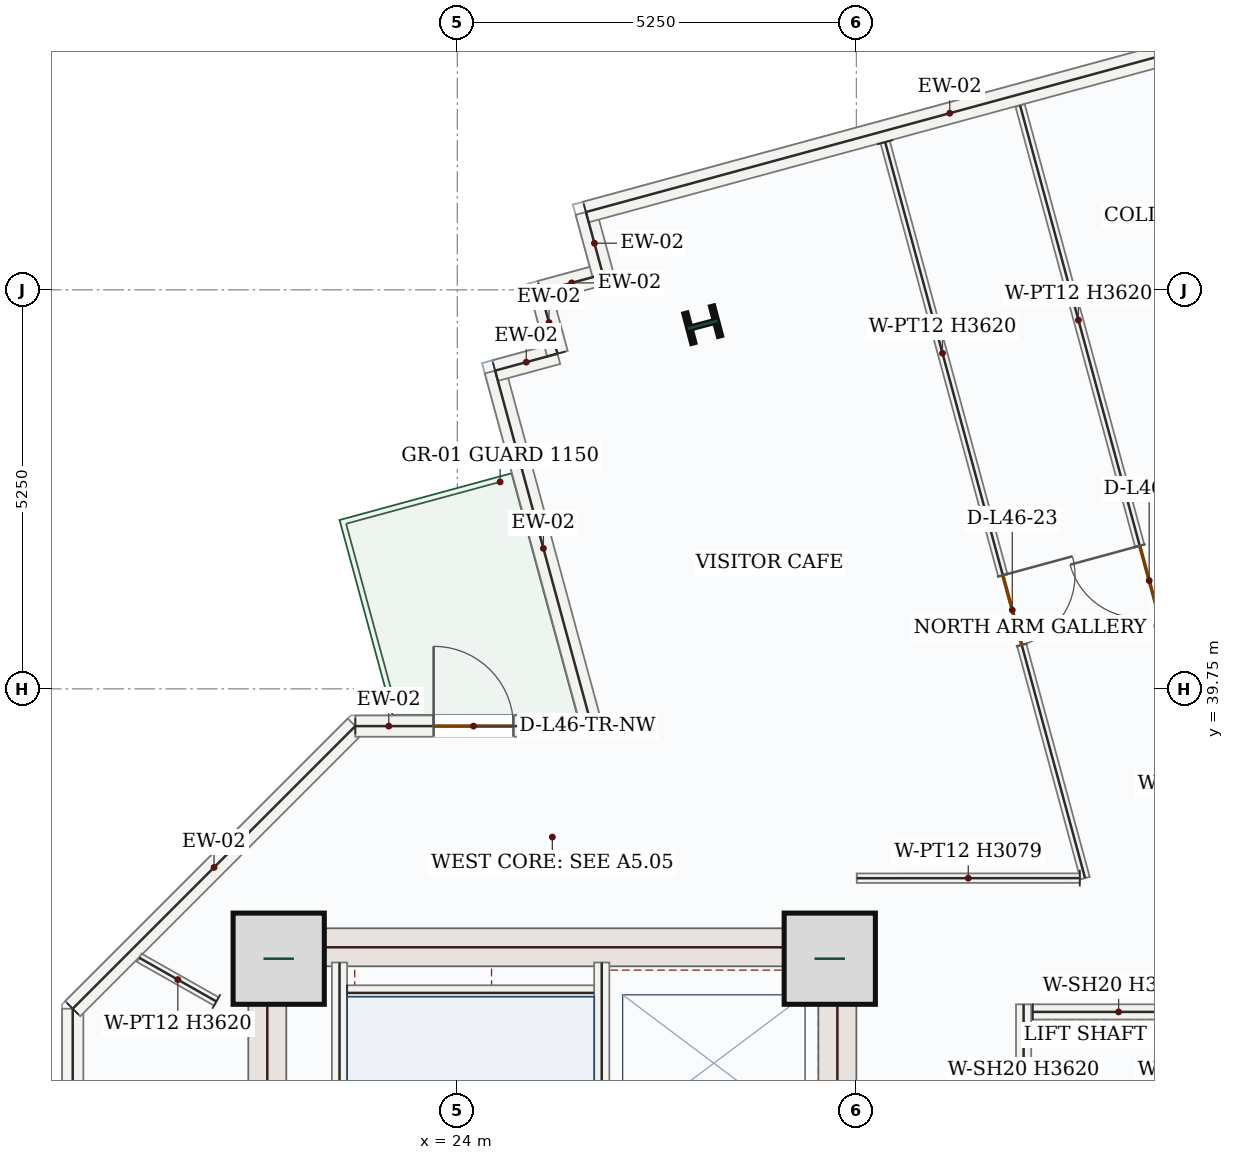
"""IFC4 building model, lengths in metres.
Left out: names, types, materials, properties, quantities, classifications, styles, units other than length and angle.
Written with IfcOpenShell. Run it as: python <this file> out.ifc"""

import sys

from ifc_helpers import new_model, si_unit, direction, frame, frame_2d, origin, origin_2d, place, context, subcontext, project, spatial, rectangle, i_section, extrude, source, transform, mapped, element, fill, save


model = new_model("IFC4")
c1 = context("Model", 3, precision=1e-05, world=origin(), true_north=direction((0.0, 1.0)))
c2 = subcontext(c1, "Body", "Model", "MODEL_VIEW")
j1 = project(units=[si_unit("LENGTHUNIT", "METRE"), si_unit("PLANEANGLEUNIT", "RADIAN")], contexts=[c1])
p1 = place(None, origin())
s1 = spatial("IfcSite", under=j1, at=p1, CompositionType="ELEMENT")
p2 = place(p1, origin())
s2 = spatial("IfcBuilding", under=s1, at=p2, CompositionType="ELEMENT")
p3 = place(p2, frame((0.0, 0.0, 198.0)))
s3 = spatial("IfcBuildingStorey", under=s2, at=p3, CompositionType="ELEMENT", Elevation=198.0)
m1 = source(origin(), c2, "Body", "SweptSolid", [
    extrude(rectangle(XDim=8.55, YDim=0.5, at=frame_2d((4.275, 0.0))), origin(), (0.0, 0.0, 1.0), 3.62),
])
p4 = place(p3, frame((21.5, 28.05, 0.0), z_axis=(0.0, 0.0, 1.0), x_axis=(0.0, 1.0, 0.0)))
e1 = element("IfcWall", 1, at=p4, inside=s3, PredefinedType="SHEAR", context=c2, shape_type="MappedRepresentation", body=[
    mapped(m1, transform((0.0, 0.0, 0.0), x_axis=(1.0, 0.0, 0.0), y_axis=(0.0, 1.0, 0.0), z_axis=(0.0, 0.0, 1.0), scale=1.0)),
])
p5 = place(p3, frame((29.0, 28.05, 0.0), z_axis=(0.0, 0.0, 1.0), x_axis=(0.0, 1.0, 0.0)))
e2 = element("IfcWall", 2, at=p5, inside=s3, PredefinedType="SHEAR", context=c2, shape_type="SweptSolid", body=[
    extrude(rectangle(XDim=8.55, YDim=0.5, at=frame_2d((4.275, 0.0))), origin(), (0.0, 0.0, 1.0), 3.62),
])
p6 = place(p5, frame((1.5, 0.0, 0.0)))
e3 = element("IfcOpeningElement", 3, at=p6, cuts=e2, PredefinedType="OPENING", context=c2, shape_type="SweptSolid", body=[
    extrude(rectangle(XDim=1.1, YDim=2.2, at=frame_2d((0.55, 1.1))), frame((0.0, 0.26, 0.0), z_axis=(0.0, -1.0, 0.0), x_axis=(1.0, 0.0, 0.0)), (0.0, 0.0, 1.0), 0.52),
])
m2 = source(origin(), c2, "Body", "SweptSolid", [
    extrude(rectangle(XDim=7.0, YDim=0.5, at=frame_2d((3.5, 0.0))), origin(), (0.0, 0.0, 1.0), 3.62),
])
p7 = place(p3, frame((21.75, 36.35, 0.0), z_axis=(0.0, 0.0, 1.0), x_axis=(1.0, 0.0, 0.0)))
e4 = element("IfcWall", 4, at=p7, inside=s3, PredefinedType="SHEAR", context=c2, shape_type="MappedRepresentation", body=[
    mapped(m2, transform((0.0, 0.0, 0.0), x_axis=(1.0, 0.0, 0.0), y_axis=(0.0, 1.0, 0.0), z_axis=(0.0, 0.0, 1.0), scale=1.0)),
])
m3 = source(origin(), c2, "Body", "SweptSolid", [
    extrude(rectangle(XDim=1.2, YDim=1.2, at=origin_2d()), origin(), (0.0, 0.0, 1.0), 3.9),
])
for number, where, z_axis, x_axis in (
    (5, (21.65, 36.2, 0.0), (0.0, 0.0, 1.0), (1.0, 0.0, 0.0)),
    (6, (28.9, 36.2, 0.0), (0.0, 0.0, 1.0), (1.0, 0.0, 0.0)),
):
    element("IfcColumn", number, at=place(p3, frame(where, z_axis=z_axis, x_axis=x_axis)), inside=s3, PredefinedType="COLUMN", context=c2, shape_type="MappedRepresentation", body=[
        mapped(m3, transform((0.0, 0.0, 0.0), x_axis=(1.0, 0.0, 0.0), y_axis=(0.0, 1.0, 0.0), z_axis=(0.0, 0.0, 1.0), scale=1.0)),
    ])
m4 = source(origin(), c2, "Body", "SweptSolid", [
    extrude(i_section(OverallWidth=0.404, OverallDepth=0.407, WebThickness=0.027, FlangeThickness=0.044, FilletRadius=0.018, at=origin_2d()), origin(), (0.0, 0.0, 1.0), 3.9),
])
p8 = place(p3, frame((27.228, 44.541, 0.0), z_axis=(0.0, 0.0, 1.0), x_axis=(-0.255445757936, 0.966823388604, 0.0)))
e7 = element("IfcColumn", 7, at=p8, inside=s3, PredefinedType="COLUMN", context=c2, shape_type="MappedRepresentation", body=[
    mapped(m4, transform((0.0, 0.0, 0.0), x_axis=(1.0, 0.0, 0.0), y_axis=(0.0, 1.0, 0.0), z_axis=(0.0, 0.0, 1.0), scale=1.0)),
])
m5 = source(origin(), c2, "Body", "SweptSolid", [
    extrude(rectangle(XDim=6.276, YDim=0.28, at=frame_2d((3.138, 0.0))), origin(), (0.0, 0.0, 1.0), 3.62),
])
p9 = place(p3, frame((18.94, 29.266, 0.0), z_axis=(0.0, 0.0, 1.0), x_axis=(0.0, 1.0, 0.0)))
e8 = element("IfcWall", 8, at=p9, inside=s3, PredefinedType="SOLIDWALL", context=c2, shape_type="MappedRepresentation", body=[
    mapped(m5, transform((0.0, 0.0, 0.0), x_axis=(1.0, 0.0, 0.0), y_axis=(0.0, 1.0, 0.0), z_axis=(0.0, 0.0, 1.0), scale=1.0)),
])
m6 = source(origin(), c2, "Body", "SweptSolid", [
    extrude(rectangle(XDim=5.258, YDim=0.28, at=frame_2d((2.629, 0.0))), origin(), (0.0, 0.0, 1.0), 3.62),
])
p10 = place(p3, frame((18.94, 35.542, 0.0), z_axis=(0.0, 0.0, 1.0), x_axis=(0.707106781187, 0.707106781187, 0.0)))
e9 = element("IfcWall", 9, at=p10, inside=s3, PredefinedType="SOLIDWALL", context=c2, shape_type="MappedRepresentation", body=[
    mapped(m6, transform((0.0, 0.0, 0.0), x_axis=(1.0, 0.0, 0.0), y_axis=(0.0, 1.0, 0.0), z_axis=(0.0, 0.0, 1.0), scale=1.0)),
])
p11 = place(p3, frame((22.658, 39.26, 0.0), z_axis=(0.0, 0.0, 1.0), x_axis=(1.0, 0.0, 0.0)))
e10 = element("IfcWall", 10, at=p11, inside=s3, PredefinedType="SOLIDWALL", context=c2, shape_type="SweptSolid", body=[
    extrude(rectangle(XDim=3.11, YDim=0.28, at=frame_2d((1.555, 0.0))), origin(), (0.0, 0.0, 1.0), 3.62),
])
p12 = place(p11, frame((1.03, 0.0, 0.0)))
e11 = element("IfcOpeningElement", 11, at=p12, cuts=e10, PredefinedType="OPENING", context=c2, shape_type="SweptSolid", body=[
    extrude(rectangle(XDim=1.05, YDim=2.15, at=frame_2d((0.525, 1.075))), frame((0.0, 0.15, 0.0), z_axis=(0.0, -1.0, 0.0), x_axis=(1.0, 0.0, 0.0)), (0.0, 0.0, 1.0), 0.3),
])
m7 = source(origin(), c2, "Body", "SweptSolid", [
    extrude(rectangle(XDim=4.846, YDim=0.28, at=frame_2d((2.423, 0.0))), origin(), (0.0, 0.0, 1.0), 3.62),
])
p13 = place(p3, frame((25.768, 39.26, 0.0), z_axis=(0.0, 0.0, 1.0), x_axis=(-0.262175182741, 0.965020296965, 0.0)))
e12 = element("IfcWall", 12, at=p13, inside=s3, PredefinedType="SOLIDWALL", context=c2, shape_type="MappedRepresentation", body=[
    mapped(m7, transform((0.0, 0.0, 0.0), x_axis=(1.0, 0.0, 0.0), y_axis=(0.0, 1.0, 0.0), z_axis=(0.0, 0.0, 1.0), scale=1.0)),
])
m8 = source(origin(), c2, "Body", "SweptSolid", [
    extrude(rectangle(XDim=0.85, YDim=0.28, at=frame_2d((0.425, 0.0))), origin(), (0.0, 0.0, 1.0), 3.62),
])
for number, where, z_axis, x_axis in (
    (13, (24.497, 43.937, 0.0), (0.0, 0.0, 1.0), (0.965, 0.262, 0.0)),
    (14, (25.317, 44.159, 0.0), (0.0, 0.0, 1.0), (-0.262, 0.965, 0.0)),
    (15, (25.094, 44.98, 0.0), (0.0, 0.0, 1.0), (0.965, 0.262, 0.0)),
    (16, (25.915, 45.202, 0.0), (0.0, 0.0, 1.0), (-0.262, 0.965, 0.0)),
):
    element("IfcWall", number, at=place(p3, frame(where, z_axis=z_axis, x_axis=x_axis)), inside=s3, PredefinedType="SOLIDWALL", context=c2, shape_type="MappedRepresentation", body=[
        mapped(m8, transform((0.0, 0.0, 0.0), x_axis=(1.0, 0.0, 0.0), y_axis=(0.0, 1.0, 0.0), z_axis=(0.0, 0.0, 1.0), scale=1.0)),
    ])
m9 = source(origin(), c2, "Body", "SweptSolid", [
    extrude(rectangle(XDim=9.92, YDim=0.28, at=frame_2d((4.96, 0.0))), origin(), (0.0, 0.0, 1.0), 3.62),
])
p14 = place(p3, frame((25.692, 46.023, 0.0), z_axis=(0.0, 0.0, 1.0), x_axis=(0.965012714082, 0.262203092393, 0.0)))
e17 = element("IfcWall", 17, at=p14, inside=s3, PredefinedType="SOLIDWALL", context=c2, shape_type="MappedRepresentation", body=[
    mapped(m9, transform((0.0, 0.0, 0.0), x_axis=(1.0, 0.0, 0.0), y_axis=(0.0, 1.0, 0.0), z_axis=(0.0, 0.0, 1.0), scale=1.0)),
])
m10 = source(origin(), c2, "Body", "SweptSolid", [
    extrude(rectangle(XDim=7.87, YDim=0.2, at=frame_2d((3.935, 0.0))), origin(), (0.0, 0.0, 1.0), 3.62),
])
p15 = place(p3, frame((22.45, 28.28, 0.0), z_axis=(0.0, 0.0, 1.0), x_axis=(0.0, 1.0, 0.0)))
e18 = element("IfcWall", 18, at=p15, inside=s3, PredefinedType="SOLIDWALL", context=c2, shape_type="MappedRepresentation", body=[
    mapped(m10, transform((0.0, 0.0, 0.0), x_axis=(1.0, 0.0, 0.0), y_axis=(0.0, 1.0, 0.0), z_axis=(0.0, 0.0, 1.0), scale=1.0)),
])
p16 = place(p3, frame((25.9, 28.15, 0.0), z_axis=(0.0, 0.0, 1.0), x_axis=(0.0, 1.0, 0.0)))
e19 = element("IfcWall", 19, at=p16, inside=s3, PredefinedType="SOLIDWALL", context=c2, shape_type="SweptSolid", body=[
    extrude(rectangle(XDim=8.0, YDim=0.2, at=frame_2d((4.0, 0.0))), origin(), (0.0, 0.0, 1.0), 3.62),
])
p17 = place(p16, frame((0.4, 0.0, 0.0)))
e20 = element("IfcOpeningElement", 20, at=p17, cuts=e19, PredefinedType="OPENING", context=c2, shape_type="SweptSolid", body=[
    extrude(rectangle(XDim=1.05, YDim=2.15, at=frame_2d((0.525, 1.075))), frame((0.0, 0.11, 0.0), z_axis=(0.0, -1.0, 0.0), x_axis=(1.0, 0.0, 0.0)), (0.0, 0.0, 1.0), 0.22),
])
m11 = source(origin(), c2, "Body", "SweptSolid", [
    extrude(rectangle(XDim=3.25, YDim=0.2, at=frame_2d((1.625, 0.0))), origin(), (0.0, 0.0, 1.0), 3.62),
])
p18 = place(p3, frame((22.55, 35.75, 0.0), z_axis=(0.0, 0.0, 1.0), x_axis=(1.0, 0.0, 0.0)))
e21 = element("IfcWall", 21, at=p18, inside=s3, PredefinedType="SOLIDWALL", context=c2, shape_type="MappedRepresentation", body=[
    mapped(m11, transform((0.0, 0.0, 0.0), x_axis=(1.0, 0.0, 0.0), y_axis=(0.0, 1.0, 0.0), z_axis=(0.0, 0.0, 1.0), scale=1.0)),
])
m12 = source(origin(), c2, "Body", "SweptSolid", [
    extrude(rectangle(XDim=2.4, YDim=0.2, at=frame_2d((1.2, 0.0))), origin(), (0.0, 0.0, 1.0), 3.62),
])
p19 = place(p3, frame((31.45, 33.2, 0.0), z_axis=(0.0, 0.0, 1.0), x_axis=(0.0, 1.0, 0.0)))
e22 = element("IfcWall", 22, at=p19, inside=s3, PredefinedType="SOLIDWALL", context=c2, shape_type="MappedRepresentation", body=[
    mapped(m12, transform((0.0, 0.0, 0.0), x_axis=(1.0, 0.0, 0.0), y_axis=(0.0, 1.0, 0.0), z_axis=(0.0, 0.0, 1.0), scale=1.0)),
])
m13 = source(origin(), c2, "Body", "SweptSolid", [
    extrude(rectangle(XDim=2.26, YDim=0.2, at=frame_2d((1.13, 0.0))), origin(), (0.0, 0.0, 1.0), 3.62),
])
p20 = place(p3, frame((31.57, 35.5, 0.0), z_axis=(0.0, 0.0, 1.0), x_axis=(1.0, 0.0, 0.0)))
e23 = element("IfcWall", 23, at=p20, inside=s3, PredefinedType="SOLIDWALL", context=c2, shape_type="MappedRepresentation", body=[
    mapped(m13, transform((0.0, 0.0, 0.0), x_axis=(1.0, 0.0, 0.0), y_axis=(0.0, 1.0, 0.0), z_axis=(0.0, 0.0, 1.0), scale=1.0)),
])
p21 = place(p3, frame((33.671, 39.082, 0.0), z_axis=(0.0, 0.0, 1.0), x_axis=(-0.262187726373, 0.965016889044, 0.0)))
e24 = element("IfcWall", 24, at=p21, inside=s3, PredefinedType="PARTITIONING", context=c2, shape_type="SweptSolid", body=[
    extrude(rectangle(XDim=8.645, YDim=0.125, at=frame_2d((4.323, 0.0))), origin(), (0.0, 0.0, 1.0), 3.62),
])
p22 = place(p21, frame((1.693, 0.0, 0.0)))
e25 = element("IfcOpeningElement", 25, at=p22, cuts=e24, PredefinedType="OPENING", context=c2, shape_type="SweptSolid", body=[
    extrude(rectangle(XDim=0.95, YDim=2.15, at=frame_2d((0.475, 1.075))), frame((0.0, 0.073, 0.0), z_axis=(0.0, -1.0, 0.0), x_axis=(1.0, 0.0, 0.0)), (0.0, 0.0, 1.0), 0.145),
])
p23 = place(p3, frame((29.628, 46.942, 0.0), z_axis=(0.0, 0.0, 1.0), x_axis=(0.262192801501, -0.965015510156, 0.0)))
e26 = element("IfcWall", 26, at=p23, inside=s3, PredefinedType="PARTITIONING", context=c2, shape_type="SweptSolid", body=[
    extrude(rectangle(XDim=10.033, YDim=0.125, at=frame_2d((5.017, 0.0))), origin(), (0.0, 0.0, 1.0), 3.62),
])
p24 = place(p23, frame((5.904, 0.0, 0.0)))
e27 = element("IfcOpeningElement", 27, at=p24, cuts=e26, PredefinedType="OPENING", context=c2, shape_type="SweptSolid", body=[
    extrude(rectangle(XDim=0.95, YDim=2.15, at=frame_2d((0.475, 1.075))), frame((0.0, 0.073, 0.0), z_axis=(0.0, -1.0, 0.0), x_axis=(1.0, 0.0, 0.0)), (0.0, 0.0, 1.0), 0.145),
])
m14 = source(origin(), c2, "Body", "SweptSolid", [
    extrude(rectangle(XDim=2.934, YDim=0.125, at=frame_2d((1.467, 0.0))), origin(), (0.0, 0.0, 1.0), 3.079),
])
p25 = place(p3, frame((32.189, 37.26, 0.0), z_axis=(0.0, 0.0, 1.0), x_axis=(-0.999999913469, -0.000416007951, 0.0)))
e28 = element("IfcWall", 28, at=p25, inside=s3, PredefinedType="PARTITIONING", context=c2, shape_type="MappedRepresentation", body=[
    mapped(m14, transform((0.0, 0.0, 0.0), x_axis=(1.0, 0.0, 0.0), y_axis=(0.0, 1.0, 0.0), z_axis=(0.0, 0.0, 1.0), scale=1.0)),
])
m15 = source(origin(), c2, "Body", "SweptSolid", [
    extrude(rectangle(XDim=1.166, YDim=0.125, at=frame_2d((0.583, 0.0))), origin(), (0.0, 0.0, 1.0), 3.62),
])
p26 = place(p3, frame((20.83, 35.638, 0.0), z_axis=(0.0, 0.0, 1.0), x_axis=(-0.870117959309, 0.492843521707, 0.0)))
e29 = element("IfcWall", 29, at=p26, inside=s3, PredefinedType="PARTITIONING", context=c2, shape_type="MappedRepresentation", body=[
    mapped(m15, transform((0.0, 0.0, 0.0), x_axis=(1.0, 0.0, 0.0), y_axis=(0.0, 1.0, 0.0), z_axis=(0.0, 0.0, 1.0), scale=1.0)),
])
m16 = source(origin(), c2, "Body", "SweptSolid", [
    extrude(rectangle(XDim=1.05, YDim=2.15, at=frame_2d((0.525, 1.075))), frame((0.0, 0.025, 0.0), z_axis=(0.0, -1.0, 0.0), x_axis=(1.0, 0.0, 0.0)), (0.0, 0.0, 1.0), 0.05),
])
p27 = place(p12, origin())
e30 = element("IfcDoor", 30, at=p27, inside=s3, OperationType="SINGLE_SWING_LEFT", PredefinedType="DOOR", context=c2, shape_type="MappedRepresentation", body=[
    mapped(m16, transform((0.0, 0.0, 0.0), x_axis=(1.0, 0.0, 0.0), y_axis=(0.0, 1.0, 0.0), z_axis=(0.0, 0.0, 1.0), scale=1.0)),
])
fill(e11, e30)
m17 = source(origin(), c2, "Body", "SweptSolid", [
    extrude(rectangle(XDim=0.95, YDim=2.15, at=frame_2d((0.475, 1.075))), frame((0.0, 0.025, 0.0), z_axis=(0.0, -1.0, 0.0), x_axis=(1.0, 0.0, 0.0)), (0.0, 0.0, 1.0), 0.05),
])
p28 = place(p22, origin())
e31 = element("IfcDoor", 31, at=p28, inside=s3, OperationType="SINGLE_SWING_RIGHT", PredefinedType="DOOR", context=c2, shape_type="MappedRepresentation", body=[
    mapped(m17, transform((0.0, 0.0, 0.0), x_axis=(1.0, 0.0, 0.0), y_axis=(0.0, 1.0, 0.0), z_axis=(0.0, 0.0, 1.0), scale=1.0)),
])
fill(e25, e31)
p29 = place(p24, origin())
e32 = element("IfcDoor", 32, at=p29, inside=s3, OperationType="SINGLE_SWING_LEFT", PredefinedType="DOOR", context=c2, shape_type="MappedRepresentation", body=[
    mapped(m17, transform((0.0, 0.0, 0.0), x_axis=(1.0, 0.0, 0.0), y_axis=(0.0, 1.0, 0.0), z_axis=(0.0, 0.0, 1.0), scale=1.0)),
])
fill(e27, e32)
save(model, sys.argv[1])
